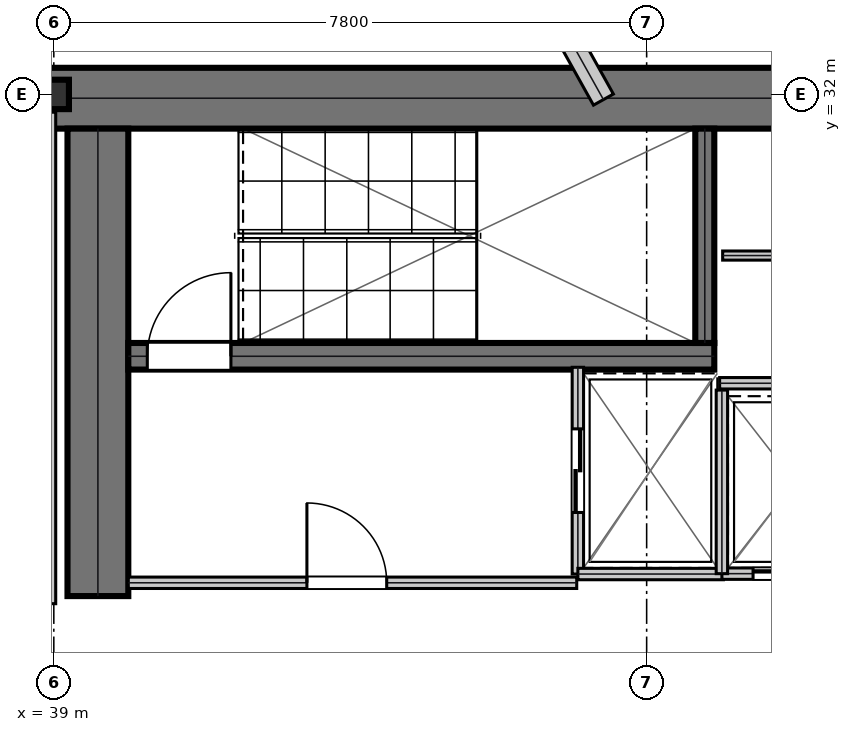
"""IFC4 building model, lengths in metres.
Left out: names, types, materials, properties, quantities, classifications, styles, units other than length and angle.
Written with IfcOpenShell. Run it as: python <this file> out.ifc"""

import sys

from ifc_helpers import new_model, si_unit, direction, frame, frame_2d, origin, origin_2d, place, context, subcontext, project, spatial, rectangle, i_section, extrude, element, fill, save


model = new_model("IFC4")
c1 = context("Model", 3, precision=1e-05, world=origin(), true_north=direction((0.0, 1.0)))
c2 = subcontext(c1, "Body", "Model", "MODEL_VIEW")
j1 = project(units=[si_unit("LENGTHUNIT", "METRE"), si_unit("PLANEANGLEUNIT", "RADIAN")], contexts=[c1])
p1 = place(None, origin())
s1 = spatial("IfcSite", under=j1, at=p1, CompositionType="ELEMENT")
p2 = place(p1, origin())
s2 = spatial("IfcBuilding", under=s1, at=p2, CompositionType="ELEMENT")
p3 = place(p2, frame((0.0, 0.0, 161.4)))
s3 = spatial("IfcBuildingStorey", under=s2, at=p3, CompositionType="ELEMENT", Elevation=161.4)
p4 = place(p3, frame((38.8, 31.95, 0.0), z_axis=(0.0, 0.0, 1.0), x_axis=(1.0, 0.0, 0.0)))
e1 = element("IfcWall", 1, at=p4, inside=s3, PredefinedType="SHEAR", context=c2, shape_type="SweptSolid", body=[
    extrude(rectangle(XDim=16.0, YDim=0.8, at=frame_2d((8.0, 0.0))), origin(), (0.0, 0.0, 1.0), 3.81),
])
p5 = place(p3, frame((39.58, 25.4, 0.0), z_axis=(0.0, 0.0, 1.0), x_axis=(0.0, 1.0, 0.0)))
e2 = element("IfcWall", 2, at=p5, inside=s3, PredefinedType="SHEAR", context=c2, shape_type="SweptSolid", body=[
    extrude(rectangle(XDim=6.15, YDim=0.8, at=frame_2d((3.075, 0.0))), origin(), (0.0, 0.0, 1.0), 3.81),
])
p6 = place(p3, frame((39.98, 28.555, 0.0), z_axis=(0.0, 0.0, 1.0), x_axis=(1.0, 0.0, 0.0)))
e3 = element("IfcWall", 3, at=p6, inside=s3, PredefinedType="SHEAR", context=c2, shape_type="SweptSolid", body=[
    extrude(rectangle(XDim=7.71, YDim=0.35, at=frame_2d((3.855, 0.0))), origin(), (0.0, 0.0, 1.0), 3.81),
])
p7 = place(p6, frame((0.25, 0.0, 0.0)))
e4 = element("IfcOpeningElement", 4, at=p7, cuts=e3, PredefinedType="OPENING", context=c2, shape_type="SweptSolid", body=[
    extrude(rectangle(XDim=1.1, YDim=2.15, at=frame_2d((0.55, 1.075))), frame((0.0, 0.185, 0.0), z_axis=(0.0, -1.0, 0.0), x_axis=(1.0, 0.0, 0.0)), (0.0, 0.0, 1.0), 0.37),
])
p8 = place(p3, frame((47.565, 28.73, 0.0), z_axis=(0.0, 0.0, 1.0), x_axis=(0.0, 1.0, 0.0)))
e5 = element("IfcWall", 5, at=p8, inside=s3, PredefinedType="SHEAR", context=c2, shape_type="SweptSolid", body=[
    extrude(rectangle(XDim=2.82, YDim=0.25, at=frame_2d((1.41, 0.0))), origin(), (0.0, 0.0, 1.0), 3.81),
])
p9 = place(p3, frame((39.0, 32.0, 0.0), z_axis=(0.0, 0.0, 1.0), x_axis=(1.0, 0.0, 0.0)))
e6 = element("IfcColumn", 6, at=p9, inside=s3, PredefinedType="COLUMN", context=c2, shape_type="SweptSolid", body=[
    extrude(i_section(OverallWidth=0.398, OverallDepth=0.387, WebThickness=0.021, FlangeThickness=0.033, at=origin_2d()), origin(), (0.0, 0.0, 1.0), 4.044),
])
p10 = place(p3, frame((46.231, 31.932, 0.0), z_axis=(0.0, 0.0, 1.0), x_axis=(-0.487234407079, 0.873271225083, 0.0)))
e7 = element("IfcWall", 7, at=p10, inside=s3, PredefinedType="STANDARD", context=c2, shape_type="SweptSolid", body=[
    extrude(rectangle(XDim=6.145, YDim=0.3, at=frame_2d((3.072, 0.0))), origin(), (0.0, 0.0, 1.0), 3.338),
])
p11 = place(p3, frame((39.98, 25.575, 0.0), z_axis=(0.0, 0.0, 1.0), x_axis=(1.0, 0.0, 0.0)))
e8 = element("IfcWall", 8, at=p11, inside=s3, PredefinedType="PARTITIONING", context=c2, shape_type="SweptSolid", body=[
    extrude(rectangle(XDim=5.9, YDim=0.15, at=frame_2d((2.95, 0.0))), origin(), (0.0, 0.0, 1.0), 3.81),
])
p12 = place(p11, frame((2.35, 0.0, 0.0)))
e9 = element("IfcOpeningElement", 9, at=p12, cuts=e8, PredefinedType="OPENING", context=c2, shape_type="SweptSolid", body=[
    extrude(rectangle(XDim=1.05, YDim=2.15, at=frame_2d((0.525, 1.075))), frame((0.0, 0.085, 0.0), z_axis=(0.0, -1.0, 0.0), x_axis=(1.0, 0.0, 0.0)), (0.0, 0.0, 1.0), 0.17),
])
p13 = place(p3, frame((45.895, 25.69, 0.0), z_axis=(0.0, 0.0, 1.0), x_axis=(0.0, 1.0, 0.0)))
e10 = element("IfcWall", 10, at=p13, inside=s3, PredefinedType="PARTITIONING", context=c2, shape_type="SweptSolid", body=[
    extrude(rectangle(XDim=2.72, YDim=0.15, at=frame_2d((1.36, 0.0))), origin(), (0.0, 0.0, 1.0), 3.81),
])
p14 = place(p13, frame((0.81, 0.0, 0.0)))
e11 = element("IfcOpeningElement", 11, at=p14, cuts=e10, PredefinedType="OPENING", context=c2, shape_type="SweptSolid", body=[
    extrude(rectangle(XDim=1.1, YDim=2.15, at=frame_2d((0.55, 1.075))), frame((0.0, 0.085, 0.0), z_axis=(0.0, -1.0, 0.0), x_axis=(1.0, 0.0, 0.0)), (0.0, 0.0, 1.0), 0.17),
])
p15 = place(p3, frame((45.895, 25.69, 0.0), z_axis=(0.0, 0.0, 1.0), x_axis=(1.0, 0.0, 0.0)))
e12 = element("IfcWall", 12, at=p15, inside=s3, PredefinedType="PARTITIONING", context=c2, shape_type="SweptSolid", body=[
    extrude(rectangle(XDim=1.915, YDim=0.15, at=frame_2d((0.958, 0.0))), origin(), (0.0, 0.0, 1.0), 3.81),
])
p16 = place(p3, frame((47.79, 25.695, 0.0), z_axis=(0.0, 0.0, 1.0), x_axis=(1.0, 0.0, 0.0)))
e13 = element("IfcWall", 13, at=p16, inside=s3, PredefinedType="PARTITIONING", context=c2, shape_type="SweptSolid", body=[
    extrude(rectangle(XDim=1.92, YDim=0.15, at=frame_2d((0.96, 0.0))), origin(), (0.0, 0.0, 1.0), 3.81),
])
p17 = place(p16, frame((0.41, 0.0, 0.0)))
e14 = element("IfcOpeningElement", 14, at=p17, cuts=e13, PredefinedType="OPENING", context=c2, shape_type="SweptSolid", body=[
    extrude(rectangle(XDim=1.1, YDim=2.15, at=frame_2d((0.55, 1.075))), frame((0.0, 0.085, 0.0), z_axis=(0.0, -1.0, 0.0), x_axis=(1.0, 0.0, 0.0)), (0.0, 0.0, 1.0), 0.17),
])
p18 = place(p3, frame((47.79, 25.695, 0.0), z_axis=(0.0, 0.0, 1.0), x_axis=(0.0, 1.0, 0.0)))
e15 = element("IfcWall", 15, at=p18, inside=s3, PredefinedType="PARTITIONING", context=c2, shape_type="SweptSolid", body=[
    extrude(rectangle(XDim=2.415, YDim=0.15, at=frame_2d((1.208, 0.0))), origin(), (0.0, 0.0, 1.0), 3.81),
])
p19 = place(p3, frame((47.76, 28.2, 0.0), z_axis=(0.0, 0.0, 1.0), x_axis=(1.0, 0.0, 0.0)))
e16 = element("IfcWall", 16, at=p19, inside=s3, PredefinedType="PARTITIONING", context=c2, shape_type="SweptSolid", body=[
    extrude(rectangle(XDim=1.99, YDim=0.15, at=frame_2d((0.995, 0.0))), origin(), (0.0, 0.0, 1.0), 3.81),
])
p20 = place(p3, frame((47.8, 29.88, 0.0), z_axis=(0.0, 0.0, 1.0), x_axis=(1.0, 0.0, 0.0)))
e17 = element("IfcWall", 17, at=p20, inside=s3, PredefinedType="PARTITIONING", context=c2, shape_type="SweptSolid", body=[
    extrude(rectangle(XDim=5.86, YDim=0.12, at=frame_2d((2.93, 0.0))), origin(), (0.0, 0.0, 1.0), 3.81),
])
p21 = place(p20, frame((2.5, 0.0, 0.0)))
e18 = element("IfcOpeningElement", 18, at=p21, cuts=e17, PredefinedType="OPENING", context=c2, shape_type="SweptSolid", body=[
    extrude(rectangle(XDim=0.85, YDim=2.15, at=frame_2d((0.425, 1.075))), frame((0.0, 0.07, 0.0), z_axis=(0.0, -1.0, 0.0), x_axis=(1.0, 0.0, 0.0)), (0.0, 0.0, 1.0), 0.14),
])
p22 = place(p3, frame((38.95, 25.3, 0.0), z_axis=(0.0, 0.0, 1.0), x_axis=(0.0, 1.0, 0.0)))
e19 = element("IfcWall", 19, at=p22, inside=s3, PredefinedType="PARTITIONING", context=c2, shape_type="SweptSolid", body=[
    extrude(rectangle(XDim=6.466, YDim=0.15, at=frame_2d((3.233, 0.0))), origin(), (0.0, 0.0, 1.0), 3.443),
])
p23 = place(p12, origin())
e20 = element("IfcDoor", 20, at=p23, inside=s3, OperationType="SINGLE_SWING_LEFT", PredefinedType="DOOR", context=c2, shape_type="SweptSolid", body=[
    extrude(rectangle(XDim=1.05, YDim=2.15, at=frame_2d((0.525, 1.075))), frame((0.0, 0.025, 0.0), z_axis=(0.0, -1.0, 0.0), x_axis=(1.0, 0.0, 0.0)), (0.0, 0.0, 1.0), 0.05),
])
fill(e9, e20)
p24 = place(p14, frame((1.1, 0.0, 0.0), z_axis=(0.0, 0.0, 1.0), x_axis=(-1.0, 0.0, 0.0)))
e21 = element("IfcDoor", 21, at=p24, inside=s3, OperationType="DOUBLE_DOOR_SLIDING", PredefinedType="DOOR", context=c2, shape_type="SweptSolid", body=[
    extrude(rectangle(XDim=1.1, YDim=2.15, at=frame_2d((0.55, 1.075))), frame((0.0, 0.025, 0.0), z_axis=(0.0, -1.0, 0.0), x_axis=(1.0, 0.0, 0.0)), (0.0, 0.0, 1.0), 0.05),
])
fill(e11, e21)
p25 = place(p17, frame((1.1, 0.0, 0.0), z_axis=(0.0, 0.0, 1.0), x_axis=(-1.0, 0.0, 0.0)))
e22 = element("IfcDoor", 22, at=p25, inside=s3, OperationType="DOUBLE_DOOR_SLIDING", PredefinedType="DOOR", context=c2, shape_type="SweptSolid", body=[
    extrude(rectangle(XDim=1.1, YDim=2.15, at=frame_2d((0.55, 1.075))), frame((0.0, 0.025, 0.0), z_axis=(0.0, -1.0, 0.0), x_axis=(1.0, 0.0, 0.0)), (0.0, 0.0, 1.0), 0.05),
])
fill(e14, e22)
p26 = place(p7, origin())
e23 = element("IfcDoor", 23, at=p26, inside=s3, OperationType="SINGLE_SWING_RIGHT", PredefinedType="DOOR", context=c2, shape_type="SweptSolid", body=[
    extrude(rectangle(XDim=1.1, YDim=2.15, at=frame_2d((0.55, 1.075))), frame((0.0, 0.025, 0.0), z_axis=(0.0, -1.0, 0.0), x_axis=(1.0, 0.0, 0.0)), (0.0, 0.0, 1.0), 0.05),
])
fill(e4, e23)
save(model, sys.argv[1])
